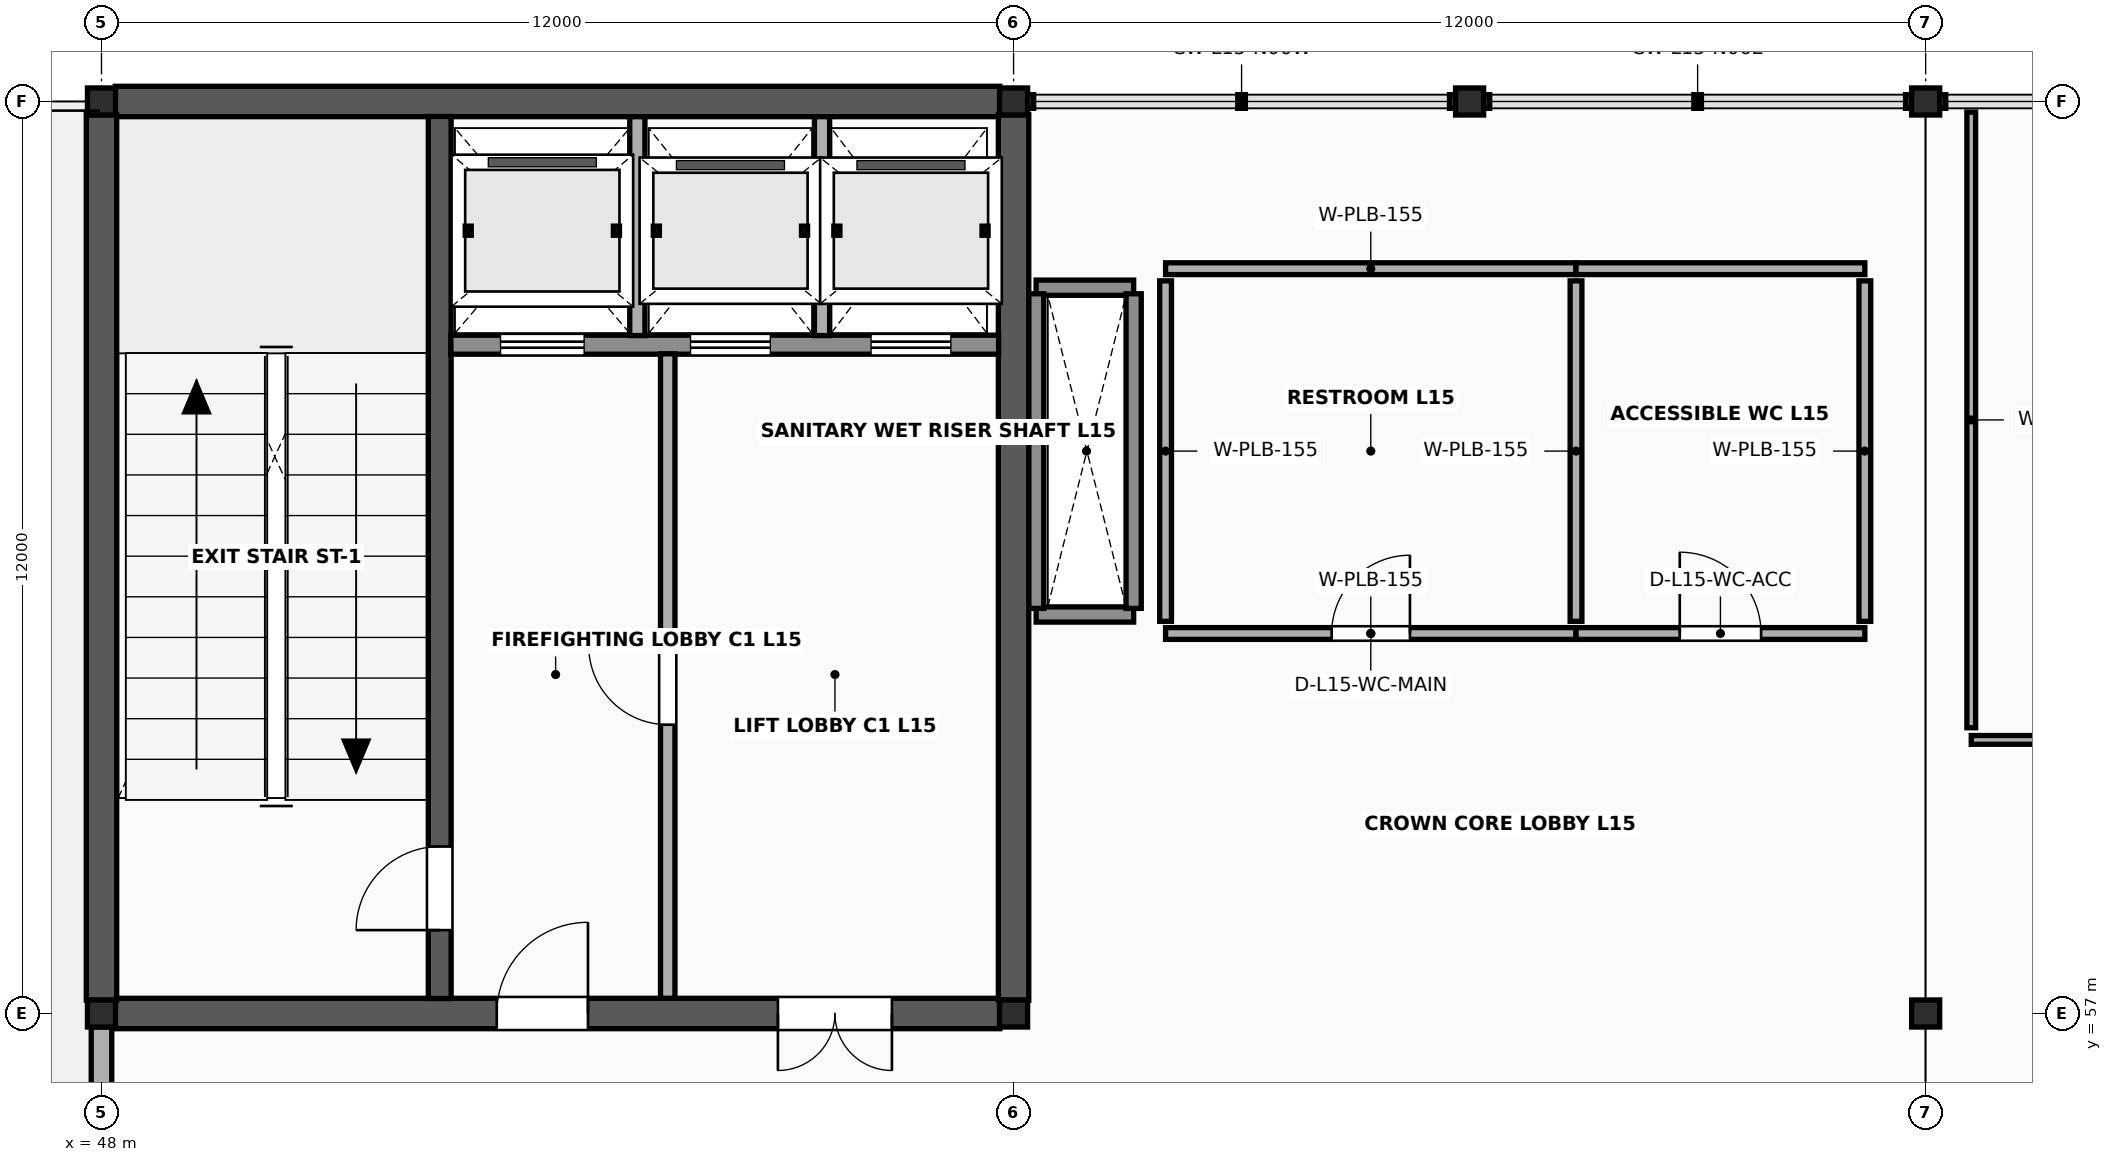
"""IFC4 building model, lengths in metres.
Left out: names, types, materials, properties, quantities, classifications, styles, units other than length and angle.
Written with IfcOpenShell. Run it as: python <this file> out.ifc"""

import sys

from ifc_helpers import new_model, si_unit, direction, frame, frame_2d, origin, origin_2d, place, context, subcontext, project, spatial, rectangle, i_section, extrude, element, fill, save


model = new_model("IFC4")
c1 = context("Model", 3, precision=1e-05, world=origin(), true_north=direction((0.0, 1.0)))
c2 = subcontext(c1, "Body", "Model", "MODEL_VIEW")
j1 = project(units=[si_unit("LENGTHUNIT", "METRE"), si_unit("PLANEANGLEUNIT", "RADIAN")], contexts=[c1])
p1 = place(None, origin())
s1 = spatial("IfcSite", under=j1, at=p1, CompositionType="ELEMENT")
p2 = place(p1, origin())
s2 = spatial("IfcBuilding", under=s1, at=p2, CompositionType="ELEMENT")
p3 = place(p2, frame((0.0, 0.0, 61.6)))
s3 = spatial("IfcBuildingStorey", under=s2, at=p3, CompositionType="ELEMENT", Elevation=61.6)
for number, where, z_axis, x_axis in (
    (1, (48.0, 57.0, 0.0), (0.0, 0.0, 1.0), (1.0, 0.0, 0.0)),
    (2, (48.0, 69.0, 0.0), (0.0, 0.0, 1.0), (1.0, 0.0, 0.0)),
    (3, (60.0, 57.0, 0.0), (0.0, 0.0, 1.0), (1.0, 0.0, 0.0)),
    (4, (60.0, 69.0, 0.0), (0.0, 0.0, 1.0), (1.0, 0.0, 0.0)),
    (5, (72.0, 57.0, 0.0), (0.0, 0.0, 1.0), (1.0, 0.0, 0.0)),
    (6, (72.0, 69.0, 0.0), (0.0, 0.0, 1.0), (1.0, 0.0, 0.0)),
    (7, (66.0, 69.0, 0.0), (0.0, 0.0, 1.0), (1.0, 0.0, 0.0)),
):
    element("IfcColumn", number, at=place(p3, frame(where, z_axis=z_axis, x_axis=x_axis)), inside=s3, PredefinedType="COLUMN", context=c2, shape_type="SweptSolid", body=[
        extrude(i_section(OverallWidth=0.369, OverallDepth=0.356, WebThickness=0.011, FlangeThickness=0.018, FilletRadius=0.018, at=origin_2d()), origin(), (0.0, 0.0, 1.0), 4.0),
    ])
for number, where, z_axis, x_axis in (
    (8, (60.297, 62.25, 0.0), (0.0, 0.0, 1.0), (1.0, 0.0, 0.0)),
    (9, (60.297, 66.55, 0.0), (0.0, 0.0, 1.0), (1.0, 0.0, 0.0)),
):
    element("IfcWall", number, at=place(p3, frame(where, z_axis=z_axis, x_axis=x_axis)), inside=s3, PredefinedType="SOLIDWALL", context=c2, shape_type="SweptSolid", body=[
        extrude(rectangle(XDim=1.283, YDim=0.2, at=frame_2d((0.642, 0.0))), origin(), (0.0, 0.0, 1.0), 3.843),
    ])
for number, where, z_axis, x_axis in (
    (10, (60.297, 62.33, 0.0), (0.0, 0.0, 1.0), (0.0, 1.0, 0.0)),
    (11, (61.58, 62.33, 0.0), (0.0, 0.0, 1.0), (0.0, 1.0, 0.0)),
):
    element("IfcWall", number, at=place(p3, frame(where, z_axis=z_axis, x_axis=x_axis)), inside=s3, PredefinedType="SOLIDWALL", context=c2, shape_type="SweptSolid", body=[
        extrude(rectangle(XDim=4.14, YDim=0.2, at=frame_2d((2.07, 0.0))), origin(), (0.0, 0.0, 1.0), 3.843),
    ])
p4 = place(p3, frame((48.181, 57.0, 0.0), z_axis=(0.0, 0.0, 1.0), x_axis=(1.0, 0.0, 0.0)))
e12 = element("IfcWall", 12, at=p4, inside=s3, PredefinedType="SHEAR", context=c2, shape_type="SweptSolid", body=[
    extrude(rectangle(XDim=11.637, YDim=0.4, at=frame_2d((5.819, 0.0))), origin(), (0.0, 0.0, 1.0), 3.843),
])
p5 = place(p4, frame((5.019, 0.0, 0.0)))
e13 = element("IfcOpeningElement", 13, at=p5, cuts=e12, PredefinedType="OPENING", context=c2, shape_type="SweptSolid", body=[
    extrude(rectangle(XDim=1.2, YDim=2.2, at=frame_2d((0.6, 1.1))), frame((0.0, 0.215, 0.0), z_axis=(0.0, -1.0, 0.0), x_axis=(1.0, 0.0, 0.0)), (0.0, 0.0, 1.0), 0.43),
])
p6 = place(p4, frame((8.718, 0.0, 0.0)))
e14 = element("IfcOpeningElement", 14, at=p6, cuts=e12, PredefinedType="OPENING", context=c2, shape_type="SweptSolid", body=[
    extrude(rectangle(XDim=1.5, YDim=2.25, at=frame_2d((0.75, 1.125))), frame((0.0, 0.215, 0.0), z_axis=(0.0, -1.0, 0.0), x_axis=(1.0, 0.0, 0.0)), (0.0, 0.0, 1.0), 0.43),
])
p7 = place(p3, frame((48.181, 69.0, 0.0), z_axis=(0.0, 0.0, 1.0), x_axis=(1.0, 0.0, 0.0)))
e15 = element("IfcWall", 15, at=p7, inside=s3, PredefinedType="SHEAR", context=c2, shape_type="SweptSolid", body=[
    extrude(rectangle(XDim=11.637, YDim=0.4, at=frame_2d((5.819, 0.0))), origin(), (0.0, 0.0, 1.0), 3.843),
])
for number, where, z_axis, x_axis in (
    (16, (48.0, 57.175, 0.0), (0.0, 0.0, 1.0), (0.0, 1.0, 0.0)),
    (17, (60.0, 57.175, 0.0), (0.0, 0.0, 1.0), (0.0, 1.0, 0.0)),
):
    element("IfcWall", number, at=place(p3, frame(where, z_axis=z_axis, x_axis=x_axis)), inside=s3, PredefinedType="SHEAR", context=c2, shape_type="SweptSolid", body=[
        extrude(rectangle(XDim=11.65, YDim=0.4, at=frame_2d((5.825, 0.0))), origin(), (0.0, 0.0, 1.0), 3.843),
    ])
p8 = place(p3, frame((52.45, 57.197, 0.0), z_axis=(0.0, 0.0, 1.0), x_axis=(0.0, 1.0, 0.0)))
e18 = element("IfcWall", 18, at=p8, inside=s3, PredefinedType="SHEAR", context=c2, shape_type="SweptSolid", body=[
    extrude(rectangle(XDim=11.606, YDim=0.3, at=frame_2d((5.803, 0.0))), origin(), (0.0, 0.0, 1.0), 3.843),
])
p9 = place(p8, frame((0.9, 0.0, 0.0)))
e19 = element("IfcOpeningElement", 19, at=p9, cuts=e18, PredefinedType="OPENING", context=c2, shape_type="SweptSolid", body=[
    extrude(rectangle(XDim=1.1, YDim=2.2, at=frame_2d((0.55, 1.1))), frame((0.0, 0.165, 0.0), z_axis=(0.0, -1.0, 0.0), x_axis=(1.0, 0.0, 0.0)), (0.0, 0.0, 1.0), 0.33),
])
p10 = place(p3, frame((52.597, 65.8, 0.0), z_axis=(0.0, 0.0, 1.0), x_axis=(1.0, 0.0, 0.0)))
e20 = element("IfcWall", 20, at=p10, inside=s3, PredefinedType="SOLIDWALL", context=c2, shape_type="SweptSolid", body=[
    extrude(rectangle(XDim=7.206, YDim=0.25, at=frame_2d((3.603, 0.0))), origin(), (0.0, 0.0, 1.0), 3.843),
])
p11 = place(p10, frame((0.653, 0.0, 0.0)))
e21 = element("IfcOpeningElement", 21, at=p11, cuts=e20, PredefinedType="OPENING", context=c2, shape_type="SweptSolid", body=[
    extrude(rectangle(XDim=1.1, YDim=2.24, at=frame_2d((0.55, 1.12))), frame((0.0, 0.14, 0.0), z_axis=(0.0, -1.0, 0.0), x_axis=(1.0, 0.0, 0.0)), (0.0, 0.0, 1.0), 0.28),
])
p12 = place(p10, frame((3.153, 0.0, 0.0)))
e22 = element("IfcOpeningElement", 22, at=p12, cuts=e20, PredefinedType="OPENING", context=c2, shape_type="SweptSolid", body=[
    extrude(rectangle(XDim=1.05, YDim=2.2, at=frame_2d((0.525, 1.1))), frame((0.0, 0.14, 0.0), z_axis=(0.0, -1.0, 0.0), x_axis=(1.0, 0.0, 0.0)), (0.0, 0.0, 1.0), 0.28),
])
p13 = place(p10, frame((5.528, 0.0, 0.0)))
e23 = element("IfcOpeningElement", 23, at=p13, cuts=e20, PredefinedType="OPENING", context=c2, shape_type="SweptSolid", body=[
    extrude(rectangle(XDim=1.05, YDim=2.2, at=frame_2d((0.525, 1.1))), frame((0.0, 0.14, 0.0), z_axis=(0.0, -1.0, 0.0), x_axis=(1.0, 0.0, 0.0)), (0.0, 0.0, 1.0), 0.28),
])
for number, where, z_axis, x_axis in (
    (24, (55.05, 65.92, 0.0), (0.0, 0.0, 1.0), (0.0, 1.0, 0.0)),
    (25, (57.48, 65.92, 0.0), (0.0, 0.0, 1.0), (0.0, 1.0, 0.0)),
):
    element("IfcWall", number, at=place(p3, frame(where, z_axis=z_axis, x_axis=x_axis)), inside=s3, PredefinedType="SOLIDWALL", context=c2, shape_type="SweptSolid", body=[
        extrude(rectangle(XDim=2.88, YDim=0.2, at=frame_2d((1.44, 0.0))), origin(), (0.0, 0.0, 1.0), 3.833),
    ])
p14 = place(p3, frame((55.45, 57.2, 0.0), z_axis=(0.0, 0.0, 1.0), x_axis=(0.0, 1.0, 0.0)))
e26 = element("IfcWall", 26, at=p14, inside=s3, PredefinedType="SOLIDWALL", context=c2, shape_type="SweptSolid", body=[
    extrude(rectangle(XDim=8.48, YDim=0.19, at=frame_2d((4.24, 0.0))), origin(), (0.0, 0.0, 1.0), 3.833),
])
p15 = place(p14, frame((3.6, 0.0, 0.0)))
e27 = element("IfcOpeningElement", 27, at=p15, cuts=e26, PredefinedType="OPENING", context=c2, shape_type="SweptSolid", body=[
    extrude(rectangle(XDim=1.04, YDim=2.18, at=frame_2d((0.52, 1.09))), frame((0.0, 0.11, 0.0), z_axis=(0.0, -1.0, 0.0), x_axis=(1.0, 0.0, 0.0)), (0.0, 0.0, 1.0), 0.22),
])
p16 = place(p3, frame((48.0, 45.176, 0.0), z_axis=(0.0, 0.0, 1.0), x_axis=(0.0, 1.0, 0.0)))
e28 = element("IfcWall", 28, at=p16, inside=s3, PredefinedType="SOLIDWALL", context=c2, shape_type="SweptSolid", body=[
    extrude(rectangle(XDim=11.648, YDim=0.27, at=frame_2d((5.824, 0.0))), origin(), (0.0, 0.0, 1.0), 3.296),
])
p17 = place(p16, frame((4.984, 0.0, 0.0)))
e29 = element("IfcOpeningElement", 29, at=p17, cuts=e28, PredefinedType="OPENING", context=c2, shape_type="SweptSolid", body=[
    extrude(rectangle(XDim=1.68, YDim=2.34, at=frame_2d((0.84, 1.17))), frame((0.0, 0.15, 0.0), z_axis=(0.0, -1.0, 0.0), x_axis=(1.0, 0.0, 0.0)), (0.0, 0.0, 1.0), 0.3),
])
p18 = place(p3, frame((62.0, 62.0, 0.0), z_axis=(0.0, 0.0, 1.0), x_axis=(1.0, 0.0, 0.0)))
e30 = element("IfcWall", 30, at=p18, inside=s3, PredefinedType="PLUMBINGWALL", context=c2, shape_type="SweptSolid", body=[
    extrude(rectangle(XDim=5.4, YDim=0.155, at=frame_2d((2.7, 0.0))), origin(), (0.0, 0.0, 1.0), 2.88),
])
p19 = place(p18, frame((2.185, 0.0, 0.0)))
e31 = element("IfcOpeningElement", 31, at=p19, cuts=e30, PredefinedType="OPENING", context=c2, shape_type="SweptSolid", body=[
    extrude(rectangle(XDim=1.03, YDim=2.17, at=frame_2d((0.515, 1.085))), frame((0.0, 0.093, 0.0), z_axis=(0.0, -1.0, 0.0), x_axis=(1.0, 0.0, 0.0)), (0.0, 0.0, 1.0), 0.185),
])
p20 = place(p3, frame((62.0, 66.8, 0.0), z_axis=(0.0, 0.0, 1.0), x_axis=(1.0, 0.0, 0.0)))
e32 = element("IfcWall", 32, at=p20, inside=s3, PredefinedType="PLUMBINGWALL", context=c2, shape_type="SweptSolid", body=[
    extrude(rectangle(XDim=5.4, YDim=0.155, at=frame_2d((2.7, 0.0))), origin(), (0.0, 0.0, 1.0), 2.88),
])
for number, where, z_axis, x_axis in (
    (33, (62.0, 62.16, 0.0), (0.0, 0.0, 1.0), (0.0, 1.0, 0.0)),
    (34, (67.4, 62.16, 0.0), (0.0, 0.0, 1.0), (0.0, 1.0, 0.0)),
):
    element("IfcWall", number, at=place(p3, frame(where, z_axis=z_axis, x_axis=x_axis)), inside=s3, PredefinedType="PLUMBINGWALL", context=c2, shape_type="SweptSolid", body=[
        extrude(rectangle(XDim=4.48, YDim=0.155, at=frame_2d((2.24, 0.0))), origin(), (0.0, 0.0, 1.0), 2.88),
    ])
p21 = place(p3, frame((67.4, 62.0, 0.0), z_axis=(0.0, 0.0, 1.0), x_axis=(1.0, 0.0, 0.0)))
e35 = element("IfcWall", 35, at=p21, inside=s3, PredefinedType="PLUMBINGWALL", context=c2, shape_type="SweptSolid", body=[
    extrude(rectangle(XDim=3.8, YDim=0.155, at=frame_2d((1.9, 0.0))), origin(), (0.0, 0.0, 1.0), 2.88),
])
p22 = place(p21, frame((1.365, 0.0, 0.0)))
e36 = element("IfcOpeningElement", 36, at=p22, cuts=e35, PredefinedType="OPENING", context=c2, shape_type="SweptSolid", body=[
    extrude(rectangle(XDim=1.07, YDim=2.19, at=frame_2d((0.535, 1.095))), frame((0.0, 0.093, 0.0), z_axis=(0.0, -1.0, 0.0), x_axis=(1.0, 0.0, 0.0)), (0.0, 0.0, 1.0), 0.185),
])
p23 = place(p3, frame((67.4, 66.8, 0.0), z_axis=(0.0, 0.0, 1.0), x_axis=(1.0, 0.0, 0.0)))
e37 = element("IfcWall", 37, at=p23, inside=s3, PredefinedType="PLUMBINGWALL", context=c2, shape_type="SweptSolid", body=[
    extrude(rectangle(XDim=3.8, YDim=0.155, at=frame_2d((1.9, 0.0))), origin(), (0.0, 0.0, 1.0), 2.88),
])
p24 = place(p3, frame((71.2, 62.16, 0.0), z_axis=(0.0, 0.0, 1.0), x_axis=(0.0, 1.0, 0.0)))
e38 = element("IfcWall", 38, at=p24, inside=s3, PredefinedType="PLUMBINGWALL", context=c2, shape_type="SweptSolid", body=[
    extrude(rectangle(XDim=4.48, YDim=0.155, at=frame_2d((2.24, 0.0))), origin(), (0.0, 0.0, 1.0), 2.88),
])
p25 = place(p3, frame((72.6, 60.6, 0.0), z_axis=(0.0, 0.0, 1.0), x_axis=(1.0, 0.0, 0.0)))
e39 = element("IfcWall", 39, at=p25, inside=s3, PredefinedType="PARTITIONING", context=c2, shape_type="SweptSolid", body=[
    extrude(rectangle(XDim=34.8, YDim=0.115, at=frame_2d((17.4, 0.0))), origin(), (0.0, 0.0, 1.0), 2.88),
])
p26 = place(p25, frame((16.565, 0.0, 0.0)))
e40 = element("IfcOpeningElement", 40, at=p26, cuts=e39, PredefinedType="OPENING", context=c2, shape_type="SweptSolid", body=[
    extrude(rectangle(XDim=1.67, YDim=2.35, at=frame_2d((0.835, 1.175))), frame((0.0, 0.073, 0.0), z_axis=(0.0, -1.0, 0.0), x_axis=(1.0, 0.0, 0.0)), (0.0, 0.0, 1.0), 0.145),
])
p27 = place(p3, frame((72.6, 60.76, 0.0), z_axis=(0.0, 0.0, 1.0), x_axis=(0.0, 1.0, 0.0)))
e41 = element("IfcWall", 41, at=p27, inside=s3, PredefinedType="PARTITIONING", context=c2, shape_type="SweptSolid", body=[
    extrude(rectangle(XDim=8.1, YDim=0.115, at=frame_2d((4.05, 0.0))), origin(), (0.0, 0.0, 1.0), 2.88),
])
p28 = place(p9, origin())
e42 = element("IfcDoor", 42, at=p28, inside=s3, OperationType="SINGLE_SWING_LEFT", PredefinedType="DOOR", context=c2, shape_type="SweptSolid", body=[
    extrude(rectangle(XDim=1.1, YDim=2.2, at=frame_2d((0.55, 1.1))), frame((0.0, 0.025, 0.0), z_axis=(0.0, -1.0, 0.0), x_axis=(1.0, 0.0, 0.0)), (0.0, 0.0, 1.0), 0.05),
])
fill(e19, e42)
p29 = place(p15, origin())
e43 = element("IfcDoor", 43, at=p29, inside=s3, OperationType="SINGLE_SWING_RIGHT", PredefinedType="DOOR", context=c2, shape_type="SweptSolid", body=[
    extrude(rectangle(XDim=1.04, YDim=2.18, at=frame_2d((0.52, 1.09))), frame((0.0, 0.025, 0.0), z_axis=(0.0, -1.0, 0.0), x_axis=(1.0, 0.0, 0.0)), (0.0, 0.0, 1.0), 0.05),
])
fill(e27, e43)
p30 = place(p5, origin())
e44 = element("IfcDoor", 44, at=p30, inside=s3, OperationType="SINGLE_SWING_RIGHT", PredefinedType="DOOR", context=c2, shape_type="SweptSolid", body=[
    extrude(rectangle(XDim=1.2, YDim=2.2, at=frame_2d((0.6, 1.1))), frame((0.0, 0.025, 0.0), z_axis=(0.0, -1.0, 0.0), x_axis=(1.0, 0.0, 0.0)), (0.0, 0.0, 1.0), 0.05),
])
fill(e13, e44)
p31 = place(p6, origin())
e45 = element("IfcDoor", 45, at=p31, inside=s3, OperationType="DOUBLE_DOOR_SINGLE_SWING", PredefinedType="DOOR", context=c2, shape_type="SweptSolid", body=[
    extrude(rectangle(XDim=1.5, YDim=2.25, at=frame_2d((0.75, 1.125))), frame((0.0, 0.025, 0.0), z_axis=(0.0, -1.0, 0.0), x_axis=(1.0, 0.0, 0.0)), (0.0, 0.0, 1.0), 0.05),
])
fill(e14, e45)
p32 = place(p11, origin())
e46 = element("IfcDoor", 46, at=p32, inside=s3, OperationType="SLIDING_TO_LEFT", PredefinedType="USERDEFINED", context=c2, shape_type="SweptSolid", body=[
    extrude(rectangle(XDim=1.1, YDim=2.24, at=frame_2d((0.55, 1.12))), frame((0.0, 0.025, 0.0), z_axis=(0.0, -1.0, 0.0), x_axis=(1.0, 0.0, 0.0)), (0.0, 0.0, 1.0), 0.05),
])
fill(e21, e46)
p33 = place(p12, origin())
e47 = element("IfcDoor", 47, at=p33, inside=s3, OperationType="SLIDING_TO_LEFT", PredefinedType="USERDEFINED", context=c2, shape_type="SweptSolid", body=[
    extrude(rectangle(XDim=1.05, YDim=2.2, at=frame_2d((0.525, 1.1))), frame((0.0, 0.025, 0.0), z_axis=(0.0, -1.0, 0.0), x_axis=(1.0, 0.0, 0.0)), (0.0, 0.0, 1.0), 0.05),
])
fill(e22, e47)
p34 = place(p13, origin())
e48 = element("IfcDoor", 48, at=p34, inside=s3, OperationType="SLIDING_TO_LEFT", PredefinedType="USERDEFINED", context=c2, shape_type="SweptSolid", body=[
    extrude(rectangle(XDim=1.05, YDim=2.2, at=frame_2d((0.525, 1.1))), frame((0.0, 0.025, 0.0), z_axis=(0.0, -1.0, 0.0), x_axis=(1.0, 0.0, 0.0)), (0.0, 0.0, 1.0), 0.05),
])
fill(e23, e48)
p35 = place(p19, origin())
e49 = element("IfcDoor", 49, at=p35, inside=s3, OperationType="SINGLE_SWING_RIGHT", PredefinedType="DOOR", context=c2, shape_type="SweptSolid", body=[
    extrude(rectangle(XDim=1.03, YDim=2.17, at=frame_2d((0.515, 1.085))), frame((0.0, 0.025, 0.0), z_axis=(0.0, -1.0, 0.0), x_axis=(1.0, 0.0, 0.0)), (0.0, 0.0, 1.0), 0.05),
])
fill(e31, e49)
p36 = place(p22, origin())
e50 = element("IfcDoor", 50, at=p36, inside=s3, OperationType="SINGLE_SWING_LEFT", PredefinedType="DOOR", context=c2, shape_type="SweptSolid", body=[
    extrude(rectangle(XDim=1.07, YDim=2.19, at=frame_2d((0.535, 1.095))), frame((0.0, 0.025, 0.0), z_axis=(0.0, -1.0, 0.0), x_axis=(1.0, 0.0, 0.0)), (0.0, 0.0, 1.0), 0.05),
])
fill(e36, e50)
save(model, sys.argv[1])
